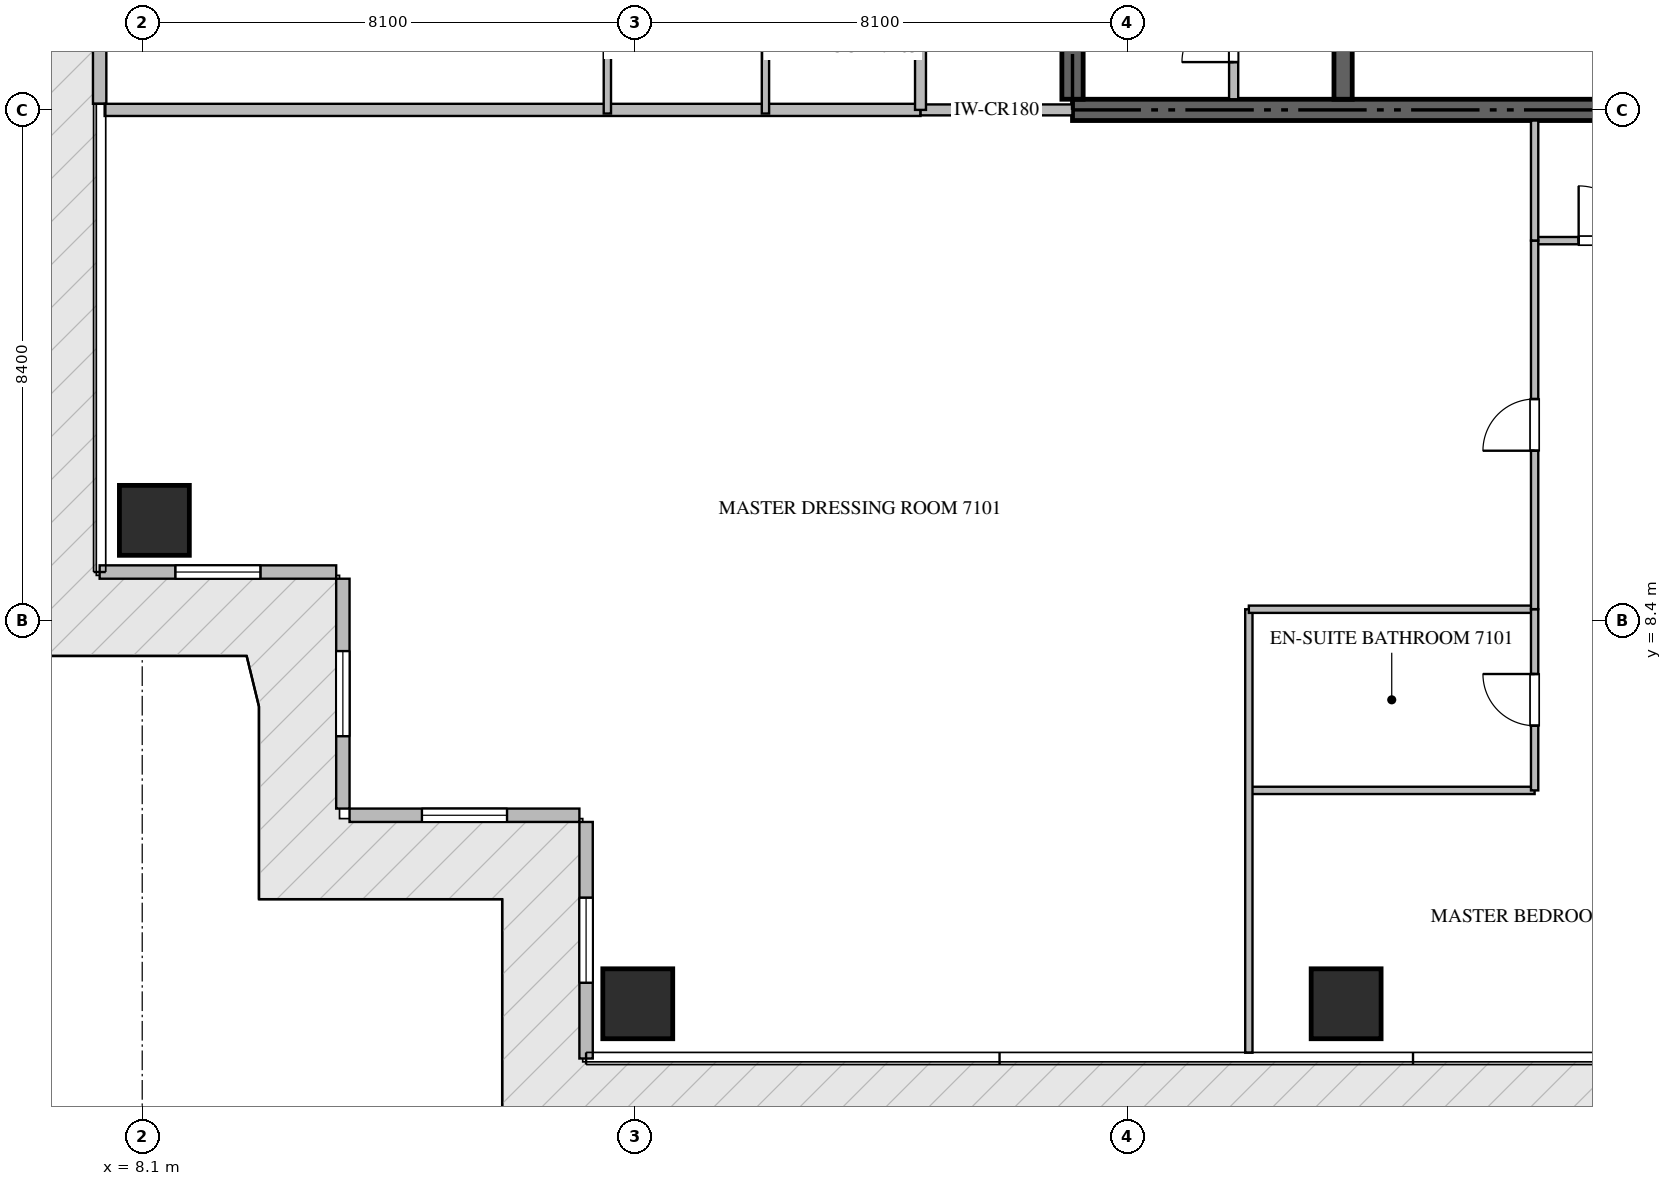
"""IFC4 building model, lengths in metres.
Left out: names, types, materials, properties, quantities, classifications, styles, units other than length and angle.
Written with IfcOpenShell. Run it as: python <this file> out.ifc"""

import sys

from ifc_helpers import new_model, si_unit, direction, frame, frame_2d, origin, origin_2d, place, context, subcontext, project, spatial, rectangle, extrude, source, transform, mapped, element, fill, save


model = new_model("IFC4")
c1 = context("Model", 3, precision=1e-05, world=origin(), true_north=direction((0.0, 1.0)))
c2 = subcontext(c1, "Body", "Model", "MODEL_VIEW")
j1 = project(units=[si_unit("LENGTHUNIT", "METRE"), si_unit("PLANEANGLEUNIT", "RADIAN")], contexts=[c1])
p1 = place(None, origin())
s1 = spatial("IfcSite", under=j1, at=p1, CompositionType="ELEMENT")
p2 = place(p1, origin())
s2 = spatial("IfcBuilding", under=s1, at=p2, CompositionType="ELEMENT")
p3 = place(p2, frame((0.0, 0.0, 283.6)))
s3 = spatial("IfcBuildingStorey", under=s2, at=p3, CompositionType="ELEMENT", Elevation=283.6)
p4 = place(p3, frame((23.4, 16.8, -0.26), z_axis=(0.0, 0.0, 1.0), x_axis=(1.0, 0.0, 0.0)))
e1 = element("IfcWall", 1, at=p4, inside=s3, PredefinedType="SHEAR", context=c2, shape_type="SweptSolid", body=[
    extrude(rectangle(XDim=18.0, YDim=0.35, at=frame_2d((9.0, 0.0))), origin(), (0.0, 0.0, 1.0), 3.668),
])
p5 = place(p3, frame((23.4, 16.975, -0.26), z_axis=(0.0, 0.0, 1.0), x_axis=(0.0, 1.0, 0.0)))
e2 = element("IfcWall", 2, at=p5, inside=s3, PredefinedType="SHEAR", context=c2, shape_type="SweptSolid", body=[
    extrude(rectangle(XDim=4.875, YDim=0.35, at=frame_2d((2.438, 0.0))), origin(), (0.0, 0.0, 1.0), 3.668),
])
p6 = place(p3, frame((27.85, 16.975, -0.26), z_axis=(0.0, 0.0, 1.0), x_axis=(0.0, 1.0, 0.0)))
e3 = element("IfcWall", 3, at=p6, inside=s3, PredefinedType="SHEAR", context=c2, shape_type="SweptSolid", body=[
    extrude(rectangle(XDim=4.875, YDim=0.3, at=frame_2d((2.438, 0.0))), origin(), (0.0, 0.0, 1.0), 3.668),
])
m1 = source(origin(), c2, "Body", "SweptSolid", [
    extrude(rectangle(XDim=1.15, YDim=1.15, at=origin_2d()), origin(), (0.0, 0.0, 1.0), 3.67),
])
for number, where, z_axis, x_axis in (
    (4, (16.25, 2.1, -0.26), (0.0, 0.0, 1.0), (1.0, 0.0, 0.0)),
    (5, (27.9, 2.1, -0.26), (0.0, 0.0, 1.0), (1.0, 0.0, 0.0)),
    (6, (8.3, 10.05, -0.26), (0.0, 0.0, 1.0), (1.0, 0.0, 0.0)),
):
    element("IfcColumn", number, at=place(p3, frame(where, z_axis=z_axis, x_axis=x_axis)), inside=s3, PredefinedType="COLUMN", context=c2, shape_type="MappedRepresentation", body=[
        mapped(m1, transform((0.0, 0.0, 0.0), scale=1.0)),
    ])
p7 = place(p3, frame((7.4, 19.9, 0.0), z_axis=(0.0, 0.0, 1.0), x_axis=(0.0, -1.0, 0.0)))
e7 = element("IfcWall", 7, at=p7, inside=s3, PredefinedType="ELEMENTEDWALL", context=c2, shape_type="SweptSolid", body=[
    extrude(rectangle(XDim=3.0, YDim=0.22, at=frame_2d((1.5, 0.0))), origin(), (0.0, 0.0, 1.0), 3.395),
])
p8 = place(p7, frame((0.95, 0.0, 0.0)))
e8 = element("IfcOpeningElement", 8, at=p8, cuts=e7, PredefinedType="OPENING", context=c2, shape_type="SweptSolid", body=[
    extrude(rectangle(XDim=1.1, YDim=2.2, at=frame_2d((0.55, 1.1))), frame((0.0, 0.12, 0.0), z_axis=(0.0, -1.0, 0.0), x_axis=(1.0, 0.0, 0.0)), (0.0, 0.0, 1.0), 0.24),
])
p9 = place(p3, frame((7.4, 9.2, 0.0), z_axis=(0.0, 0.0, 1.0), x_axis=(1.0, 0.0, 0.0)))
e9 = element("IfcWall", 9, at=p9, inside=s3, PredefinedType="ELEMENTEDWALL", context=c2, shape_type="SweptSolid", body=[
    extrude(rectangle(XDim=3.89, YDim=0.22, at=frame_2d((1.945, 0.0))), origin(), (0.0, 0.0, 1.0), 3.395),
])
p10 = place(p9, frame((1.245, 0.0, 0.65)))
e10 = element("IfcOpeningElement", 10, at=p10, cuts=e9, PredefinedType="OPENING", context=c2, shape_type="SweptSolid", body=[
    extrude(rectangle(XDim=1.4, YDim=1.35, at=frame_2d((0.7, 0.675))), frame((0.0, 0.12, 0.0), z_axis=(0.0, -1.0, 0.0), x_axis=(1.0, 0.0, 0.0)), (0.0, 0.0, 1.0), 0.24),
])
p11 = place(p3, frame((11.4, 9.09, 0.0), z_axis=(0.0, 0.0, 1.0), x_axis=(0.0, -1.0, 0.0)))
e11 = element("IfcWall", 11, at=p11, inside=s3, PredefinedType="ELEMENTEDWALL", context=c2, shape_type="SweptSolid", body=[
    extrude(rectangle(XDim=3.78, YDim=0.22, at=frame_2d((1.89, 0.0))), origin(), (0.0, 0.0, 1.0), 3.395),
])
p12 = place(p11, frame((1.19, 0.0, 0.65)))
e12 = element("IfcOpeningElement", 12, at=p12, cuts=e11, PredefinedType="OPENING", context=c2, shape_type="SweptSolid", body=[
    extrude(rectangle(XDim=1.4, YDim=1.35, at=frame_2d((0.7, 0.675))), frame((0.0, 0.12, 0.0), z_axis=(0.0, -1.0, 0.0), x_axis=(1.0, 0.0, 0.0)), (0.0, 0.0, 1.0), 0.24),
])
p13 = place(p3, frame((11.51, 5.2, 0.0), z_axis=(0.0, 0.0, 1.0), x_axis=(1.0, 0.0, 0.0)))
e13 = element("IfcWall", 13, at=p13, inside=s3, PredefinedType="ELEMENTEDWALL", context=c2, shape_type="SweptSolid", body=[
    extrude(rectangle(XDim=3.78, YDim=0.22, at=frame_2d((1.89, 0.0))), origin(), (0.0, 0.0, 1.0), 3.395),
])
p14 = place(p13, frame((1.19, 0.0, 0.65)))
e14 = element("IfcOpeningElement", 14, at=p14, cuts=e13, PredefinedType="OPENING", context=c2, shape_type="SweptSolid", body=[
    extrude(rectangle(XDim=1.4, YDim=1.35, at=frame_2d((0.7, 0.675))), frame((0.0, 0.12, 0.0), z_axis=(0.0, -1.0, 0.0), x_axis=(1.0, 0.0, 0.0)), (0.0, 0.0, 1.0), 0.24),
])
p15 = place(p3, frame((15.4, 5.09, 0.0), z_axis=(0.0, 0.0, 1.0), x_axis=(0.0, -1.0, 0.0)))
e15 = element("IfcWall", 15, at=p15, inside=s3, PredefinedType="ELEMENTEDWALL", context=c2, shape_type="SweptSolid", body=[
    extrude(rectangle(XDim=3.89, YDim=0.22, at=frame_2d((1.945, 0.0))), origin(), (0.0, 0.0, 1.0), 3.395),
])
p16 = place(p15, frame((1.245, 0.0, 0.65)))
e16 = element("IfcOpeningElement", 16, at=p16, cuts=e15, PredefinedType="OPENING", context=c2, shape_type="SweptSolid", body=[
    extrude(rectangle(XDim=1.4, YDim=1.35, at=frame_2d((0.7, 0.675))), frame((0.0, 0.12, 0.0), z_axis=(0.0, -1.0, 0.0), x_axis=(1.0, 0.0, 0.0)), (0.0, 0.0, 1.0), 0.24),
])
p17 = place(p3, frame((26.05, 16.975, 0.0), z_axis=(0.0, 0.0, 1.0), x_axis=(0.0, 1.0, 0.0)))
e17 = element("IfcWall", 17, at=p17, inside=s3, PredefinedType="PARTITIONING", context=c2, shape_type="SweptSolid", body=[
    extrude(rectangle(XDim=2.073, YDim=0.15, at=frame_2d((1.037, 0.0))), origin(), (0.0, 0.0, 1.0), 3.41),
])
p18 = place(p17, frame((0.611, 0.0, 0.0)))
e18 = element("IfcOpeningElement", 18, at=p18, cuts=e17, PredefinedType="OPENING", context=c2, shape_type="SweptSolid", body=[
    extrude(rectangle(XDim=0.85, YDim=2.1, at=frame_2d((0.425, 1.05))), frame((0.0, 0.085, 0.0), z_axis=(0.0, -1.0, 0.0), x_axis=(1.0, 0.0, 0.0)), (0.0, 0.0, 1.0), 0.17),
])
p19 = place(p3, frame((7.482, 16.8, 0.0), z_axis=(0.0, 0.0, 1.0), x_axis=(1.0, 0.0, 0.0)))
e19 = element("IfcWall", 19, at=p19, inside=s3, PredefinedType="PARTITIONING", context=c2, shape_type="SweptSolid", body=[
    extrude(rectangle(XDim=13.418, YDim=0.2, at=frame_2d((6.709, 0.0))), origin(), (0.0, 0.0, 1.0), 3.41),
])
p20 = place(p3, frame((20.902, 16.8, 0.0), z_axis=(0.0, 0.0, 1.0), x_axis=(1.0, 0.0, 0.0)))
e20 = element("IfcWall", 20, at=p20, inside=s3, PredefinedType="PARTITIONING", context=c2, shape_type="SweptSolid", body=[
    extrude(rectangle(XDim=2.496, YDim=0.18, at=frame_2d((1.248, 0.0))), origin(), (0.0, 0.0, 1.0), 3.41),
])
p21 = place(p3, frame((20.9, 16.8, 0.0), z_axis=(0.0, 0.0, 1.0), x_axis=(0.0, 1.0, 0.0)))
e21 = element("IfcWall", 21, at=p21, inside=s3, PredefinedType="PARTITIONING", context=c2, shape_type="SweptSolid", body=[
    extrude(rectangle(XDim=16.8, YDim=0.18, at=frame_2d((8.4, 0.0))), origin(), (0.0, 0.0, 1.0), 3.41),
])
p22 = place(p21, frame((4.693, 0.0, 0.0)))
e22 = element("IfcOpeningElement", 22, at=p22, cuts=e21, PredefinedType="OPENING", context=c2, shape_type="SweptSolid", body=[
    extrude(rectangle(XDim=1.0, YDim=2.15, at=frame_2d((0.5, 1.075))), frame((0.0, 0.1, 0.0), z_axis=(0.0, -1.0, 0.0), x_axis=(1.0, 0.0, 0.0)), (0.0, 0.0, 1.0), 0.2),
])
p23 = place(p21, frame((13.13, 0.0, 0.0)))
e23 = element("IfcOpeningElement", 23, at=p23, cuts=e21, PredefinedType="OPENING", context=c2, shape_type="SweptSolid", body=[
    extrude(rectangle(XDim=1.0, YDim=2.15, at=frame_2d((0.5, 1.075))), frame((0.0, 0.1, 0.0), z_axis=(0.0, -1.0, 0.0), x_axis=(1.0, 0.0, 0.0)), (0.0, 0.0, 1.0), 0.2),
])
p24 = place(p3, frame((31.0, 14.65, 0.0), z_axis=(0.0, 0.0, 1.0), x_axis=(1.0, 0.0, 0.0)))
e24 = element("IfcWall", 24, at=p24, inside=s3, PredefinedType="PARTITIONING", context=c2, shape_type="SweptSolid", body=[
    extrude(rectangle(XDim=2.348, YDim=0.12, at=frame_2d((1.174, 0.0))), origin(), (0.0, 0.0, 1.0), 3.41),
])
p25 = place(p24, frame((0.724, 0.0, 0.0)))
e25 = element("IfcOpeningElement", 25, at=p25, cuts=e24, PredefinedType="OPENING", context=c2, shape_type="SweptSolid", body=[
    extrude(rectangle(XDim=0.9, YDim=2.1, at=frame_2d((0.45, 1.05))), frame((0.0, 0.07, 0.0), z_axis=(0.0, -1.0, 0.0), x_axis=(1.0, 0.0, 0.0)), (0.0, 0.0, 1.0), 0.14),
])
p26 = place(p3, frame((26.3, 5.609, 0.0), z_axis=(0.0, 0.0, 1.0), x_axis=(1.0, 0.0, 0.0)))
e26 = element("IfcWall", 26, at=p26, inside=s3, PredefinedType="PARTITIONING", context=c2, shape_type="SweptSolid", body=[
    extrude(rectangle(XDim=4.7, YDim=0.12, at=frame_2d((2.35, 0.0))), origin(), (0.0, 0.0, 1.0), 3.41),
])
p27 = place(p3, frame((26.3, 1.295, 0.0), z_axis=(0.0, 0.0, 1.0), x_axis=(0.0, 1.0, 0.0)))
e27 = element("IfcWall", 27, at=p27, inside=s3, PredefinedType="PARTITIONING", context=c2, shape_type="SweptSolid", body=[
    extrude(rectangle(XDim=7.293, YDim=0.12, at=frame_2d((3.646, 0.0))), origin(), (0.0, 0.0, 1.0), 3.41),
])
p28 = place(p3, frame((26.3, 8.588, 0.0), z_axis=(0.0, 0.0, 1.0), x_axis=(1.0, 0.0, 0.0)))
e28 = element("IfcWall", 28, at=p28, inside=s3, PredefinedType="PARTITIONING", context=c2, shape_type="SweptSolid", body=[
    extrude(rectangle(XDim=4.7, YDim=0.12, at=frame_2d((2.35, 0.0))), origin(), (0.0, 0.0, 1.0), 3.41),
])
p29 = place(p3, frame((31.0, 5.609, 0.0), z_axis=(0.0, 0.0, 1.0), x_axis=(0.0, 1.0, 0.0)))
e29 = element("IfcWall", 29, at=p29, inside=s3, PredefinedType="PARTITIONING", context=c2, shape_type="SweptSolid", body=[
    extrude(rectangle(XDim=2.979, YDim=0.12, at=frame_2d((1.49, 0.0))), origin(), (0.0, 0.0, 1.0), 3.41),
])
p30 = place(p29, frame((1.064, 0.0, 0.0)))
e30 = element("IfcOpeningElement", 30, at=p30, cuts=e29, PredefinedType="OPENING", context=c2, shape_type="SweptSolid", body=[
    extrude(rectangle(XDim=0.85, YDim=2.1, at=frame_2d((0.425, 1.05))), frame((0.0, 0.07, 0.0), z_axis=(0.0, -1.0, 0.0), x_axis=(1.0, 0.0, 0.0)), (0.0, 0.0, 1.0), 0.14),
])
p31 = place(p3, frame((31.0, 8.59, 0.0), z_axis=(0.0, 0.0, 1.0), x_axis=(0.0, 1.0, 0.0)))
e31 = element("IfcWall", 31, at=p31, inside=s3, PredefinedType="PARTITIONING", context=c2, shape_type="SweptSolid", body=[
    extrude(rectangle(XDim=6.06, YDim=0.12, at=frame_2d((3.03, 0.0))), origin(), (0.0, 0.0, 1.0), 3.41),
])
p32 = place(p31, frame((2.605, 0.0, 0.0)))
e32 = element("IfcOpeningElement", 32, at=p32, cuts=e31, PredefinedType="OPENING", context=c2, shape_type="SweptSolid", body=[
    extrude(rectangle(XDim=0.85, YDim=2.1, at=frame_2d((0.425, 1.05))), frame((0.0, 0.07, 0.0), z_axis=(0.0, -1.0, 0.0), x_axis=(1.0, 0.0, 0.0)), (0.0, 0.0, 1.0), 0.14),
])
p33 = place(p3, frame((31.0, 14.652, 0.0), z_axis=(0.0, 0.0, 1.0), x_axis=(0.0, 1.0, 0.0)))
e33 = element("IfcWall", 33, at=p33, inside=s3, PredefinedType="PARTITIONING", context=c2, shape_type="SweptSolid", body=[
    extrude(rectangle(XDim=1.973, YDim=0.12, at=frame_2d((0.986, 0.0))), origin(), (0.0, 0.0, 1.0), 3.41),
])
p34 = place(p3, frame((18.35, 16.74, 0.0), z_axis=(0.0, 0.0, 1.0), x_axis=(0.0, 1.0, 0.0)))
e34 = element("IfcWall", 34, at=p34, inside=s3, PredefinedType="PARTITIONING", context=c2, shape_type="SweptSolid", body=[
    extrude(rectangle(XDim=2.66, YDim=0.12, at=frame_2d((1.33, 0.0))), origin(), (0.0, 0.0, 1.0), 3.41),
])
p35 = place(p3, frame((15.75, 16.74, 0.0), z_axis=(0.0, 0.0, 1.0), x_axis=(0.0, 1.0, 0.0)))
e35 = element("IfcWall", 35, at=p35, inside=s3, PredefinedType="PARTITIONING", context=c2, shape_type="SweptSolid", body=[
    extrude(rectangle(XDim=2.66, YDim=0.12, at=frame_2d((1.33, 0.0))), origin(), (0.0, 0.0, 1.0), 2.245),
])
m2 = source(origin(), c2, "Body", "SweptSolid", [
    extrude(rectangle(XDim=1.4, YDim=1.35, at=frame_2d((0.7, 0.675))), frame((0.0, 0.03, 0.0), z_axis=(0.0, -1.0, 0.0), x_axis=(1.0, 0.0, 0.0)), (0.0, 0.0, 1.0), 0.06),
])
p36 = place(p10, origin())
e36 = element("IfcWindow", 36, at=p36, inside=s3, PartitioningType="SINGLE_PANEL", PredefinedType="WINDOW", context=c2, shape_type="MappedRepresentation", body=[
    mapped(m2, transform((0.0, 0.0, 0.0), scale=1.0)),
])
fill(e10, e36)
p37 = place(p12, origin())
e37 = element("IfcWindow", 37, at=p37, inside=s3, PartitioningType="SINGLE_PANEL", PredefinedType="WINDOW", context=c2, shape_type="MappedRepresentation", body=[
    mapped(m2, transform((0.0, 0.0, 0.0), scale=1.0)),
])
fill(e12, e37)
p38 = place(p14, origin())
e38 = element("IfcWindow", 38, at=p38, inside=s3, PartitioningType="SINGLE_PANEL", PredefinedType="WINDOW", context=c2, shape_type="MappedRepresentation", body=[
    mapped(m2, transform((0.0, 0.0, 0.0), scale=1.0)),
])
fill(e14, e38)
p39 = place(p16, origin())
e39 = element("IfcWindow", 39, at=p39, inside=s3, PartitioningType="SINGLE_PANEL", PredefinedType="WINDOW", context=c2, shape_type="MappedRepresentation", body=[
    mapped(m2, transform((0.0, 0.0, 0.0), scale=1.0)),
])
fill(e16, e39)
m3 = source(origin(), c2, "Body", "SweptSolid", [
    extrude(rectangle(XDim=0.85, YDim=2.1, at=frame_2d((0.425, 1.05))), frame((0.0, 0.025, 0.0), z_axis=(0.0, -1.0, 0.0), x_axis=(1.0, 0.0, 0.0)), (0.0, 0.0, 1.0), 0.05),
])
p40 = place(p18, origin())
e40 = element("IfcDoor", 40, at=p40, inside=s3, OperationType="SINGLE_SWING_LEFT", PredefinedType="DOOR", context=c2, shape_type="MappedRepresentation", body=[
    mapped(m3, transform((0.0, 0.0, 0.0), scale=1.0)),
])
fill(e18, e40)
m4 = source(origin(), c2, "Body", "SweptSolid", [
    extrude(rectangle(XDim=0.9, YDim=2.1, at=frame_2d((0.45, 1.05))), frame((0.0, 0.025, 0.0), z_axis=(0.0, -1.0, 0.0), x_axis=(1.0, 0.0, 0.0)), (0.0, 0.0, 1.0), 0.05),
])
p41 = place(p25, origin())
e41 = element("IfcDoor", 41, at=p41, inside=s3, OperationType="SINGLE_SWING_LEFT", PredefinedType="DOOR", context=c2, shape_type="MappedRepresentation", body=[
    mapped(m4, transform((0.0, 0.0, 0.0), scale=1.0)),
])
fill(e25, e41)
p42 = place(p30, origin())
e42 = element("IfcDoor", 42, at=p42, inside=s3, OperationType="SINGLE_SWING_RIGHT", PredefinedType="DOOR", context=c2, shape_type="MappedRepresentation", body=[
    mapped(m3, transform((0.0, 0.0, 0.0), scale=1.0)),
])
fill(e30, e42)
p43 = place(p32, origin())
e43 = element("IfcDoor", 43, at=p43, inside=s3, OperationType="SINGLE_SWING_LEFT", PredefinedType="DOOR", context=c2, shape_type="MappedRepresentation", body=[
    mapped(m3, transform((0.0, 0.0, 0.0), scale=1.0)),
])
fill(e32, e43)
save(model, sys.argv[1])
